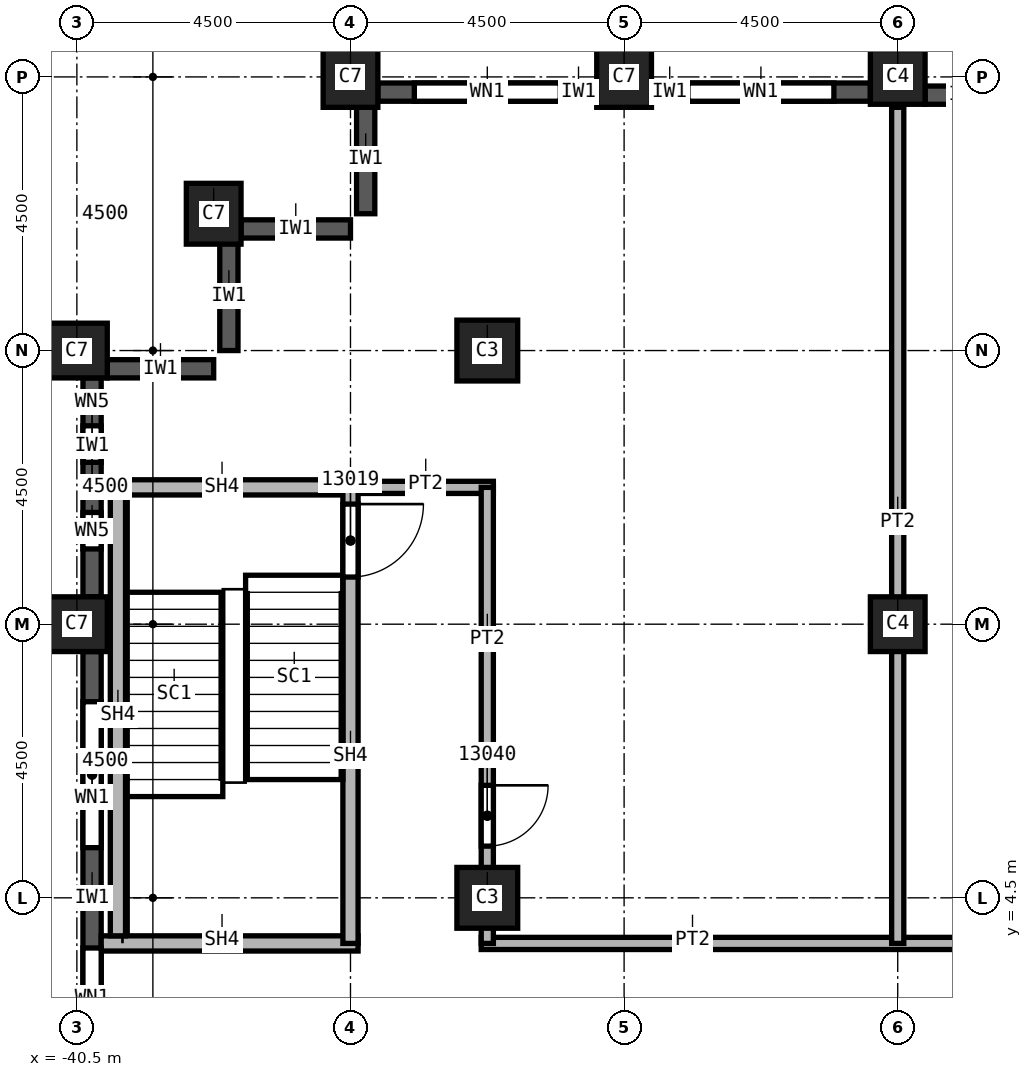
"""IFC4 building model, lengths in metres.
Left out: names, types, materials, properties, quantities, classifications, styles, units other than length and angle.
Written with IfcOpenShell. Run it as: python <this file> out.ifc"""

import sys

from ifc_helpers import new_model, si_unit, direction, frame, frame_2d, origin, origin_2d, place, context, subcontext, project, spatial, rectangle, extrude, element, fill, save


model = new_model("IFC4")
c1 = context("Model", 3, precision=1e-05, world=origin(), true_north=direction((0.0, 1.0)))
c2 = subcontext(c1, "Body", "Model", "MODEL_VIEW")
j1 = project(units=[si_unit("LENGTHUNIT", "METRE"), si_unit("PLANEANGLEUNIT", "RADIAN")], contexts=[c1])
p1 = place(None, origin())
s1 = spatial("IfcSite", under=j1, at=p1, CompositionType="ELEMENT")
p2 = place(p1, origin())
s2 = spatial("IfcBuilding", under=s1, at=p2, CompositionType="ELEMENT")
p3 = place(p2, frame((0.0, 0.0, 208.0)))
s3 = spatial("IfcBuildingStorey", under=s2, at=p3, CompositionType="ELEMENT", Elevation=208.0)
for number, where, z_axis, x_axis in (
    (1, (-40.5, 9.0, 0.0), (0.0, 0.0, 1.0), (0.0, 1.0, 0.0)),
    (2, (-40.5, 13.5, 0.0), (0.0, 0.0, 1.0), (0.0, 1.0, 0.0)),
    (3, (-38.25, 15.75, 0.0), (0.0, 0.0, 1.0), (1.0, 0.0, 0.0)),
    (4, (-31.5, 18.0, 0.0), (0.0, 0.0, 1.0), (1.0, 0.0, 0.0)),
    (5, (-36.0, 18.0, 0.0), (0.0, 0.0, 1.0), (1.0, 0.0, 0.0)),
):
    element("IfcColumn", number, at=place(p3, frame(where, z_axis=z_axis, x_axis=x_axis)), inside=s3, PredefinedType="COLUMN", context=c2, shape_type="SweptSolid", body=[
        extrude(rectangle(XDim=0.9, YDim=1.0, at=origin_2d()), origin(), (0.0, 0.0, 1.0), 3.72),
    ])
for number, where, z_axis, x_axis in (
    (6, (-33.75, 4.5, 0.0), (0.0, 0.0, 1.0), (1.0, 0.0, 0.0)),
    (7, (-33.75, 13.5, 0.0), (0.0, 0.0, 1.0), (1.0, 0.0, 0.0)),
):
    element("IfcColumn", number, at=place(p3, frame(where, z_axis=z_axis, x_axis=x_axis)), inside=s3, PredefinedType="COLUMN", context=c2, shape_type="SweptSolid", body=[
        extrude(rectangle(XDim=1.0, YDim=1.0, at=origin_2d()), origin(), (0.0, 0.0, 1.0), 3.72),
    ])
for number, where, z_axis, x_axis in (
    (8, (-27.0, 9.0, 0.0), (0.0, 0.0, 1.0), (1.0, 0.0, 0.0)),
    (9, (-27.0, 18.0, 0.0), (0.0, 0.0, 1.0), (1.0, 0.0, 0.0)),
):
    element("IfcColumn", number, at=place(p3, frame(where, z_axis=z_axis, x_axis=x_axis)), inside=s3, PredefinedType="COLUMN", context=c2, shape_type="SweptSolid", body=[
        extrude(rectangle(XDim=0.9, YDim=0.9, at=origin_2d()), origin(), (0.0, 0.0, 1.0), 3.72),
    ])
for number, where, z_axis, x_axis in (
    (10, (-35.75, 17.55, 0.0), (0.0, 0.0, 1.0), (0.0, -1.0, 0.0)),
    (11, (-37.8, 15.5, 0.0), (0.0, 0.0, 1.0), (1.0, 0.0, 0.0)),
    (12, (-38.0, 15.3, 0.0), (0.0, 0.0, 1.0), (0.0, -1.0, 0.0)),
):
    element("IfcWall", number, at=place(p3, frame(where, z_axis=z_axis, x_axis=x_axis)), inside=s3, PredefinedType="SOLIDWALL", context=c2, shape_type="SweptSolid", body=[
        extrude(rectangle(XDim=1.8, YDim=0.3, at=frame_2d((0.9, 0.0))), origin(), (0.0, 0.0, 1.0), 3.12),
    ])
p4 = place(p3, frame((-40.0, 13.2, 0.0), z_axis=(0.0, 0.0, 1.0), x_axis=(1.0, 0.0, 0.0)))
e13 = element("IfcWall", 13, at=p4, inside=s3, PredefinedType="SOLIDWALL", context=c2, shape_type="SweptSolid", body=[
    extrude(rectangle(XDim=1.75, YDim=0.3, at=frame_2d((0.875, 0.0))), origin(), (0.0, 0.0, 1.0), 3.12),
])
p5 = place(p3, frame((-25.2, 17.7, 0.0), z_axis=(0.0, 0.0, 1.0), x_axis=(-1.0, 0.0, 0.0)))
e14 = element("IfcWall", 14, at=p5, inside=s3, PredefinedType="SOLIDWALL", context=c2, shape_type="SweptSolid", body=[
    extrude(rectangle(XDim=1.35, YDim=0.3, at=frame_2d((0.675, 0.0))), origin(), (0.0, 0.0, 1.0), 3.12),
])
p6 = place(p3, frame((-27.45, 17.75, 0.0), z_axis=(0.0, 0.0, 1.0), x_axis=(-1.0, 0.0, 0.0)))
e15 = element("IfcWall", 15, at=p6, inside=s3, PredefinedType="SOLIDWALL", context=c2, shape_type="SweptSolid", body=[
    extrude(rectangle(XDim=3.6, YDim=0.3, at=frame_2d((1.8, 0.0))), origin(), (0.0, 0.0, 1.0), 3.12),
])
p7 = place(p6, frame((0.6, 0.0, 0.8)))
e16 = element("IfcOpeningElement", 16, at=p7, cuts=e15, PredefinedType="OPENING", context=c2, shape_type="SweptSolid", body=[
    extrude(rectangle(XDim=2.4, YDim=1.95, at=frame_2d((1.2, 0.975))), frame((0.0, 0.15, 0.0), z_axis=(0.0, -1.0, 0.0), x_axis=(1.0, 0.0, 0.0)), (0.0, 0.0, 1.0), 0.3),
])
p8 = place(p3, frame((-31.95, 17.75, 0.0), z_axis=(0.0, 0.0, 1.0), x_axis=(-1.0, 0.0, 0.0)))
e17 = element("IfcWall", 17, at=p8, inside=s3, PredefinedType="SOLIDWALL", context=c2, shape_type="SweptSolid", body=[
    extrude(rectangle(XDim=3.6, YDim=0.3, at=frame_2d((1.8, 0.0))), origin(), (0.0, 0.0, 1.0), 3.12),
])
p9 = place(p8, frame((0.6, 0.0, 0.8)))
e18 = element("IfcOpeningElement", 18, at=p9, cuts=e17, PredefinedType="OPENING", context=c2, shape_type="SweptSolid", body=[
    extrude(rectangle(XDim=2.4, YDim=1.95, at=frame_2d((1.2, 0.975))), frame((0.0, 0.15, 0.0), z_axis=(0.0, -1.0, 0.0), x_axis=(1.0, 0.0, 0.0)), (0.0, 0.0, 1.0), 0.3),
])
p10 = place(p3, frame((-40.25, 13.05, 0.0), z_axis=(0.0, 0.0, 1.0), x_axis=(0.0, -1.0, 0.0)))
e19 = element("IfcWall", 19, at=p10, inside=s3, PredefinedType="SOLIDWALL", context=c2, shape_type="SweptSolid", body=[
    extrude(rectangle(XDim=3.6, YDim=0.3, at=frame_2d((1.8, 0.0))), origin(), (0.0, 0.0, 1.0), 3.12),
])
p11 = place(p10, frame((0.788, 0.0, 0.8)))
e20 = element("IfcOpeningElement", 20, at=p11, cuts=e19, PredefinedType="OPENING", context=c2, shape_type="SweptSolid", body=[
    extrude(rectangle(XDim=0.6, YDim=1.95, at=frame_2d((0.3, 0.975))), frame((0.0, 0.15, 0.0), z_axis=(0.0, -1.0, 0.0), x_axis=(1.0, 0.0, 0.0)), (0.0, 0.0, 1.0), 0.3),
])
p12 = place(p10, frame((2.212, 0.0, 0.8)))
e21 = element("IfcOpeningElement", 21, at=p12, cuts=e19, PredefinedType="OPENING", context=c2, shape_type="SweptSolid", body=[
    extrude(rectangle(XDim=0.6, YDim=1.95, at=frame_2d((0.3, 0.975))), frame((0.0, 0.15, 0.0), z_axis=(0.0, -1.0, 0.0), x_axis=(1.0, 0.0, 0.0)), (0.0, 0.0, 1.0), 0.3),
])
p13 = place(p3, frame((-40.25, 8.55, 0.0), z_axis=(0.0, 0.0, 1.0), x_axis=(0.0, -1.0, 0.0)))
e22 = element("IfcWall", 22, at=p13, inside=s3, PredefinedType="SOLIDWALL", context=c2, shape_type="SweptSolid", body=[
    extrude(rectangle(XDim=8.1, YDim=0.3, at=frame_2d((4.05, 0.0))), origin(), (0.0, 0.0, 1.0), 3.12),
])
p14 = place(p13, frame((0.825, 0.0, 0.8)))
e23 = element("IfcOpeningElement", 23, at=p14, cuts=e22, PredefinedType="OPENING", context=c2, shape_type="SweptSolid", body=[
    extrude(rectangle(XDim=2.4, YDim=1.95, at=frame_2d((1.2, 0.975))), frame((0.0, 0.15, 0.0), z_axis=(0.0, -1.0, 0.0), x_axis=(1.0, 0.0, 0.0)), (0.0, 0.0, 1.0), 0.3),
])
p15 = place(p13, frame((4.875, 0.0, 0.8)))
e24 = element("IfcOpeningElement", 24, at=p15, cuts=e22, PredefinedType="OPENING", context=c2, shape_type="SweptSolid", body=[
    extrude(rectangle(XDim=2.4, YDim=1.95, at=frame_2d((1.2, 0.975))), frame((0.0, 0.15, 0.0), z_axis=(0.0, -1.0, 0.0), x_axis=(1.0, 0.0, 0.0)), (0.0, 0.0, 1.0), 0.3),
])
p16 = place(p3, frame((-36.0, 11.25, 0.0), z_axis=(0.0, 0.0, 1.0), x_axis=(1.0, 0.0, 0.0)))
e25 = element("IfcWall", 25, at=p16, inside=s3, PredefinedType="PARTITIONING", context=c2, shape_type="SweptSolid", body=[
    extrude(rectangle(XDim=2.35, YDim=0.2, at=frame_2d((1.175, 0.0))), origin(), (0.0, 0.0, 1.0), 3.72),
])
p17 = place(p3, frame((-33.85, 3.75, 0.0), z_axis=(0.0, 0.0, 1.0), x_axis=(1.0, 0.0, 0.0)))
e26 = element("IfcWall", 26, at=p17, inside=s3, PredefinedType="PARTITIONING", context=c2, shape_type="SweptSolid", body=[
    extrude(rectangle(XDim=18.45, YDim=0.2, at=frame_2d((9.225, 0.0))), origin(), (0.0, 0.0, 1.0), 3.72),
])
p18 = place(p3, frame((-33.75, 11.25, 0.0), z_axis=(0.0, 0.0, 1.0), x_axis=(0.0, -1.0, 0.0)))
e27 = element("IfcWall", 27, at=p18, inside=s3, PredefinedType="PARTITIONING", context=c2, shape_type="SweptSolid", body=[
    extrude(rectangle(XDim=7.5, YDim=0.2, at=frame_2d((3.75, 0.0))), origin(), (0.0, 0.0, 1.0), 3.72),
])
p19 = place(p18, frame((4.9, 0.0, 0.0)))
e28 = element("IfcOpeningElement", 28, at=p19, cuts=e27, PredefinedType="OPENING", context=c2, shape_type="SweptSolid", body=[
    extrude(rectangle(XDim=1.0, YDim=2.1, at=frame_2d((0.5, 1.05))), frame((0.0, 0.1, 0.0), z_axis=(0.0, -1.0, 0.0), x_axis=(1.0, 0.0, 0.0)), (0.0, 0.0, 1.0), 0.2),
])
p20 = place(p3, frame((-27.0, 3.75, 0.0), z_axis=(0.0, 0.0, 1.0), x_axis=(0.0, 1.0, 0.0)))
e29 = element("IfcWall", 29, at=p20, inside=s3, PredefinedType="PARTITIONING", context=c2, shape_type="SweptSolid", body=[
    extrude(rectangle(XDim=13.75, YDim=0.2, at=frame_2d((6.875, 0.0))), origin(), (0.0, 0.0, 1.0), 3.72),
])
p21 = place(p3, frame((-40.1, 3.75, 0.0), z_axis=(0.0, 0.0, 1.0), x_axis=(1.0, 0.0, 0.0)))
e30 = element("IfcWall", 30, at=p21, inside=s3, PredefinedType="SOLIDWALL", context=c2, shape_type="SweptSolid", body=[
    extrude(rectangle(XDim=4.225, YDim=0.25, at=frame_2d((2.113, 0.0))), origin(), (0.0, 0.0, 1.0), 3.72),
])
p22 = place(p3, frame((-40.1, 11.25, 0.0), z_axis=(0.0, 0.0, 1.0), x_axis=(1.0, 0.0, 0.0)))
e31 = element("IfcWall", 31, at=p22, inside=s3, PredefinedType="SOLIDWALL", context=c2, shape_type="SweptSolid", body=[
    extrude(rectangle(XDim=4.1, YDim=0.25, at=frame_2d((2.05, 0.0))), origin(), (0.0, 0.0, 1.0), 3.72),
])
p23 = place(p3, frame((-36.0, 11.375, 0.0), z_axis=(0.0, 0.0, 1.0), x_axis=(0.0, -1.0, 0.0)))
e32 = element("IfcWall", 32, at=p23, inside=s3, PredefinedType="SOLIDWALL", context=c2, shape_type="SweptSolid", body=[
    extrude(rectangle(XDim=7.625, YDim=0.25, at=frame_2d((3.812, 0.0))), origin(), (0.0, 0.0, 1.0), 3.72),
])
p24 = place(p23, frame((0.4, 0.0, 0.0)))
e33 = element("IfcOpeningElement", 33, at=p24, cuts=e32, PredefinedType="OPENING", context=c2, shape_type="SweptSolid", body=[
    extrude(rectangle(XDim=1.2, YDim=2.1, at=frame_2d((0.6, 1.05))), frame((0.0, 0.125, 0.0), z_axis=(0.0, -1.0, 0.0), x_axis=(1.0, 0.0, 0.0)), (0.0, 0.0, 1.0), 0.25),
])
p25 = place(p3, frame((-39.825, 3.875, 0.0), z_axis=(0.0, 0.0, 1.0), x_axis=(0.0, 1.0, 0.0)))
e34 = element("IfcWall", 34, at=p25, inside=s3, PredefinedType="SOLIDWALL", context=c2, shape_type="SweptSolid", body=[
    extrude(rectangle(XDim=7.25, YDim=0.25, at=frame_2d((3.625, 0.0))), origin(), (0.0, 0.0, 1.0), 3.72),
])
p26 = place(p7, origin())
e35 = element("IfcWindow", 35, at=p26, inside=s3, PartitioningType="SINGLE_PANEL", PredefinedType="WINDOW", context=c2, shape_type="SweptSolid", body=[
    extrude(rectangle(XDim=2.4, YDim=1.95, at=frame_2d((1.2, 0.975))), frame((0.0, 0.03, 0.0), z_axis=(0.0, -1.0, 0.0), x_axis=(1.0, 0.0, 0.0)), (0.0, 0.0, 1.0), 0.06),
])
fill(e16, e35)
p27 = place(p9, origin())
e36 = element("IfcWindow", 36, at=p27, inside=s3, PartitioningType="SINGLE_PANEL", PredefinedType="WINDOW", context=c2, shape_type="SweptSolid", body=[
    extrude(rectangle(XDim=2.4, YDim=1.95, at=frame_2d((1.2, 0.975))), frame((0.0, 0.03, 0.0), z_axis=(0.0, -1.0, 0.0), x_axis=(1.0, 0.0, 0.0)), (0.0, 0.0, 1.0), 0.06),
])
fill(e18, e36)
p28 = place(p14, origin())
e37 = element("IfcWindow", 37, at=p28, inside=s3, PartitioningType="SINGLE_PANEL", PredefinedType="WINDOW", context=c2, shape_type="SweptSolid", body=[
    extrude(rectangle(XDim=2.4, YDim=1.95, at=frame_2d((1.2, 0.975))), frame((0.0, 0.03, 0.0), z_axis=(0.0, -1.0, 0.0), x_axis=(1.0, 0.0, 0.0)), (0.0, 0.0, 1.0), 0.06),
])
fill(e23, e37)
p29 = place(p15, origin())
e38 = element("IfcWindow", 38, at=p29, inside=s3, PartitioningType="SINGLE_PANEL", PredefinedType="WINDOW", context=c2, shape_type="SweptSolid", body=[
    extrude(rectangle(XDim=2.4, YDim=1.95, at=frame_2d((1.2, 0.975))), frame((0.0, 0.03, 0.0), z_axis=(0.0, -1.0, 0.0), x_axis=(1.0, 0.0, 0.0)), (0.0, 0.0, 1.0), 0.06),
])
fill(e24, e38)
p30 = place(p24, origin())
e39 = element("IfcDoor", 39, at=p30, inside=s3, OperationType="SINGLE_SWING_RIGHT", PredefinedType="DOOR", context=c2, shape_type="SweptSolid", body=[
    extrude(rectangle(XDim=1.2, YDim=2.1, at=frame_2d((0.6, 1.05))), frame((0.0, 0.025, 0.0), z_axis=(0.0, -1.0, 0.0), x_axis=(1.0, 0.0, 0.0)), (0.0, 0.0, 1.0), 0.05),
])
fill(e33, e39)
p31 = place(p19, origin())
e40 = element("IfcDoor", 40, at=p31, inside=s3, OperationType="SINGLE_SWING_LEFT", PredefinedType="DOOR", context=c2, shape_type="SweptSolid", body=[
    extrude(rectangle(XDim=1.0, YDim=2.1, at=frame_2d((0.5, 1.05))), frame((0.0, 0.025, 0.0), z_axis=(0.0, -1.0, 0.0), x_axis=(1.0, 0.0, 0.0)), (0.0, 0.0, 1.0), 0.05),
])
fill(e28, e40)
p32 = place(p11, origin())
e41 = element("IfcWindow", 41, at=p32, inside=s3, PartitioningType="SINGLE_PANEL", PredefinedType="WINDOW", context=c2, shape_type="SweptSolid", body=[
    extrude(rectangle(XDim=0.6, YDim=1.95, at=frame_2d((0.3, 0.975))), frame((0.0, 0.03, 0.0), z_axis=(0.0, -1.0, 0.0), x_axis=(1.0, 0.0, 0.0)), (0.0, 0.0, 1.0), 0.06),
])
fill(e20, e41)
p33 = place(p12, origin())
e42 = element("IfcWindow", 42, at=p33, inside=s3, PartitioningType="SINGLE_PANEL", PredefinedType="WINDOW", context=c2, shape_type="SweptSolid", body=[
    extrude(rectangle(XDim=0.6, YDim=1.95, at=frame_2d((0.3, 0.975))), frame((0.0, 0.03, 0.0), z_axis=(0.0, -1.0, 0.0), x_axis=(1.0, 0.0, 0.0)), (0.0, 0.0, 1.0), 0.06),
])
fill(e21, e42)
save(model, sys.argv[1])
